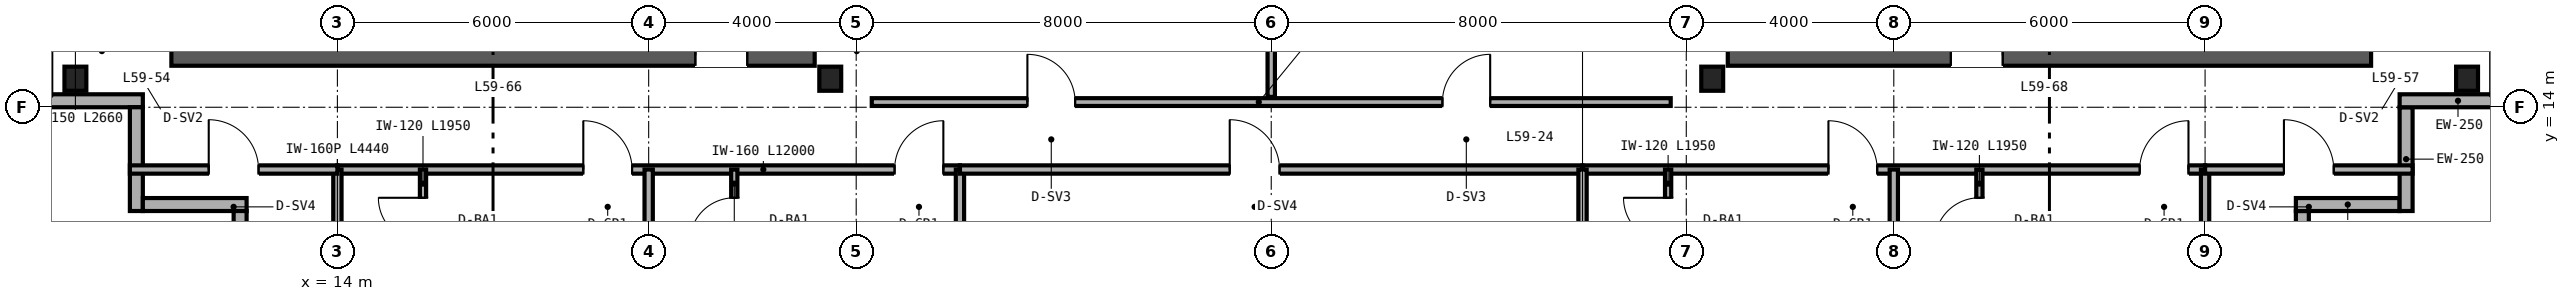
"""IFC4 building model, lengths in metres.
Left out: names, types, materials, properties, quantities, classifications, styles, units other than length and angle.
Written with IfcOpenShell. Run it as: python <this file> out.ifc"""

import sys

from ifc_helpers import new_model, si_unit, direction, frame, frame_2d, origin, origin_2d, place, context, subcontext, project, spatial, rectangle, i_section, extrude, source, transform, mapped, element, fill, save


model = new_model("IFC4")
c1 = context("Model", 3, precision=1e-05, world=origin(), true_north=direction((0.0, 1.0)))
c2 = subcontext(c1, "Body", "Model", "MODEL_VIEW")
j1 = project(units=[si_unit("LENGTHUNIT", "METRE"), si_unit("PLANEANGLEUNIT", "RADIAN")], contexts=[c1])
p1 = place(None, origin())
s1 = spatial("IfcSite", under=j1, at=p1, CompositionType="ELEMENT")
p2 = place(p1, origin())
s2 = spatial("IfcBuilding", under=s1, at=p2, CompositionType="ELEMENT")
p3 = place(p2, frame((0.0, 0.0, 236.4)))
s3 = spatial("IfcBuildingStorey", under=s2, at=p3, CompositionType="ELEMENT", Elevation=236.4)
p4 = place(p3, frame((10.8, 15.0, 0.0), z_axis=(0.0, 0.0, 1.0), x_axis=(1.0, 0.0, 0.0)))
e1 = element("IfcWall", 1, at=p4, inside=s3, PredefinedType="SHEAR", context=c2, shape_type="SweptSolid", body=[
    extrude(rectangle(XDim=12.4, YDim=0.4, at=frame_2d((6.2, 0.0))), origin(), (0.0, 0.0, 1.0), 3.38),
])
p5 = place(p4, frame((10.1, 0.0, 0.0)))
e2 = element("IfcOpeningElement", 2, at=p5, cuts=e1, PredefinedType="OPENING", context=c2, shape_type="SweptSolid", body=[
    extrude(rectangle(XDim=1.0, YDim=2.15, at=frame_2d((0.5, 1.075))), frame((0.0, 0.21, 0.0), z_axis=(0.0, -1.0, 0.0), x_axis=(1.0, 0.0, 0.0)), (0.0, 0.0, 1.0), 0.42),
])
p6 = place(p3, frame((40.8, 15.0, 0.0), z_axis=(0.0, 0.0, 1.0), x_axis=(1.0, 0.0, 0.0)))
e3 = element("IfcWall", 3, at=p6, inside=s3, PredefinedType="SHEAR", context=c2, shape_type="SweptSolid", body=[
    extrude(rectangle(XDim=12.4, YDim=0.4, at=frame_2d((6.2, 0.0))), origin(), (0.0, 0.0, 1.0), 3.38),
])
p7 = place(p6, frame((4.3, 0.0, 0.0)))
e4 = element("IfcOpeningElement", 4, at=p7, cuts=e3, PredefinedType="OPENING", context=c2, shape_type="SweptSolid", body=[
    extrude(rectangle(XDim=1.0, YDim=2.15, at=frame_2d((0.5, 1.075))), frame((0.0, 0.21, 0.0), z_axis=(0.0, -1.0, 0.0), x_axis=(1.0, 0.0, 0.0)), (0.0, 0.0, 1.0), 0.42),
])
m1 = source(origin(), c2, "Body", "SweptSolid", [
    extrude(i_section(OverallWidth=0.422, OverallDepth=0.465, WebThickness=0.045, FlangeThickness=0.073, FilletRadius=0.025, at=origin_2d()), origin(), (0.0, 0.0, 1.0), 3.38),
])
for number, where, z_axis, x_axis in (
    (5, (8.95, 14.55, 0.0), (0.0, 0.0, 1.0), (1.0, 0.0, 0.0)),
    (6, (23.5, 14.55, 0.0), (0.0, 0.0, 1.0), (1.0, 0.0, 0.0)),
    (7, (40.5, 14.55, 0.0), (0.0, 0.0, 1.0), (1.0, 0.0, 0.0)),
    (8, (55.05, 14.55, 0.0), (0.0, 0.0, 1.0), (1.0, 0.0, 0.0)),
):
    element("IfcColumn", number, at=place(p3, frame(where, z_axis=z_axis, x_axis=x_axis)), inside=s3, PredefinedType="COLUMN", context=c2, shape_type="MappedRepresentation", body=[
        mapped(m1, transform((0.0, 0.0, 0.0), scale=1.0)),
    ])
p8 = place(p3, frame((51.875, 10.0, 0.0), z_axis=(0.0, 0.0, 1.0), x_axis=(0.0, 1.0, 0.0)))
e9 = element("IfcWall", 9, at=p8, inside=s3, PredefinedType="SOLIDWALL", context=c2, shape_type="SweptSolid", body=[
    extrude(rectangle(XDim=2.0, YDim=0.25, at=frame_2d((1.0, 0.0))), origin(), (0.0, 0.0, 1.0), 3.38),
])
p9 = place(p8, frame((0.5, 0.0, 0.85)))
e10 = element("IfcOpeningElement", 10, at=p9, cuts=e9, PredefinedType="OPENING", context=c2, shape_type="SweptSolid", body=[
    extrude(rectangle(XDim=1.0, YDim=1.9, at=frame_2d((0.5, 0.95))), frame((0.0, 0.135, 0.0), z_axis=(0.0, -1.0, 0.0), x_axis=(1.0, 0.0, 0.0)), (0.0, 0.0, 1.0), 0.27),
])
for number, where, z_axis, x_axis in (
    (11, (51.75, 12.125, 0.0), (0.0, 0.0, 1.0), (1.0, 0.0, 0.0)),
    (12, (53.875, 12.0, 0.0), (0.0, 0.0, 1.0), (0.0, 1.0, 0.0)),
):
    element("IfcWall", number, at=place(p3, frame(where, z_axis=z_axis, x_axis=x_axis)), inside=s3, PredefinedType="SOLIDWALL", context=c2, shape_type="SweptSolid", body=[
        extrude(rectangle(XDim=2.0, YDim=0.25, at=frame_2d((1.0, 0.0))), origin(), (0.0, 0.0, 1.0), 3.38),
    ])
for number, where, z_axis, x_axis in (
    (13, (53.75, 14.125, 0.0), (0.0, 0.0, 1.0), (1.0, 0.0, 0.0)),
    (14, (8.0, 14.125, 0.0), (0.0, 0.0, 1.0), (1.0, 0.0, 0.0)),
):
    element("IfcWall", number, at=place(p3, frame(where, z_axis=z_axis, x_axis=x_axis)), inside=s3, PredefinedType="SOLIDWALL", context=c2, shape_type="SweptSolid", body=[
        extrude(rectangle(XDim=2.25, YDim=0.25, at=frame_2d((1.125, 0.0))), origin(), (0.0, 0.0, 1.0), 3.38),
    ])
for number, where, z_axis, x_axis in (
    (15, (10.125, 14.0, 0.0), (0.0, 0.0, 1.0), (0.0, -1.0, 0.0)),
    (16, (10.25, 12.125, 0.0), (0.0, 0.0, 1.0), (1.0, 0.0, 0.0)),
    (17, (12.125, 12.0, 0.0), (0.0, 0.0, 1.0), (0.0, -1.0, 0.0)),
):
    element("IfcWall", number, at=place(p3, frame(where, z_axis=z_axis, x_axis=x_axis)), inside=s3, PredefinedType="SOLIDWALL", context=c2, shape_type="SweptSolid", body=[
        extrude(rectangle(XDim=2.0, YDim=0.25, at=frame_2d((1.0, 0.0))), origin(), (0.0, 0.0, 1.0), 3.38),
    ])
p10 = place(p3, frame((32.0, 14.2, 0.0), z_axis=(0.0, 0.0, 1.0), x_axis=(0.0, 1.0, 0.0)))
e18 = element("IfcWall", 18, at=p10, inside=s3, PredefinedType="PARTITIONING", context=c2, shape_type="SweptSolid", body=[
    extrude(rectangle(XDim=2.65, YDim=0.142, at=frame_2d((1.325, 0.0))), origin(), (0.0, 0.0, 1.0), 3.38),
])
p11 = place(p3, frame((24.3, 14.1, 0.0), z_axis=(0.0, 0.0, 1.0), x_axis=(1.0, 0.0, 0.0)))
e19 = element("IfcWall", 19, at=p11, inside=s3, PredefinedType="PARTITIONING", context=c2, shape_type="SweptSolid", body=[
    extrude(rectangle(XDim=15.4, YDim=0.15, at=frame_2d((7.7, 0.0))), origin(), (0.0, 0.0, 1.0), 3.38),
])
p12 = place(p11, frame((3.0, 0.0, 0.0)))
e20 = element("IfcOpeningElement", 20, at=p12, cuts=e19, PredefinedType="OPENING", context=c2, shape_type="SweptSolid", body=[
    extrude(rectangle(XDim=0.92, YDim=2.15, at=frame_2d((0.46, 1.075))), frame((0.0, 0.085, 0.0), z_axis=(0.0, -1.0, 0.0), x_axis=(1.0, 0.0, 0.0)), (0.0, 0.0, 1.0), 0.17),
])
p13 = place(p11, frame((11.0, 0.0, 0.0)))
e21 = element("IfcOpeningElement", 21, at=p13, cuts=e19, PredefinedType="OPENING", context=c2, shape_type="SweptSolid", body=[
    extrude(rectangle(XDim=0.92, YDim=2.15, at=frame_2d((0.46, 1.075))), frame((0.0, 0.085, 0.0), z_axis=(0.0, -1.0, 0.0), x_axis=(1.0, 0.0, 0.0)), (0.0, 0.0, 1.0), 0.17),
])
p14 = place(p3, frame((14.0, 12.8, 0.0), z_axis=(0.0, 0.0, 1.0), x_axis=(1.0, 0.0, 0.0)))
e22 = element("IfcWall", 22, at=p14, inside=s3, PredefinedType="PARTITIONING", context=c2, shape_type="SweptSolid", body=[
    extrude(rectangle(XDim=12.0, YDim=0.16, at=frame_2d((6.0, 0.0))), origin(), (0.0, 0.0, 1.0), 2.923),
])
p15 = place(p14, frame((4.74, 0.0, 0.0)))
e23 = element("IfcOpeningElement", 23, at=p15, cuts=e22, PredefinedType="OPENING", context=c2, shape_type="SweptSolid", body=[
    extrude(rectangle(XDim=0.94, YDim=2.15, at=frame_2d((0.47, 1.075))), frame((0.0, 0.09, 0.0), z_axis=(0.0, -1.0, 0.0), x_axis=(1.0, 0.0, 0.0)), (0.0, 0.0, 1.0), 0.18),
])
p16 = place(p14, frame((10.74, 0.0, 0.0)))
e24 = element("IfcOpeningElement", 24, at=p16, cuts=e22, PredefinedType="OPENING", context=c2, shape_type="SweptSolid", body=[
    extrude(rectangle(XDim=0.94, YDim=2.15, at=frame_2d((0.47, 1.075))), frame((0.0, 0.09, 0.0), z_axis=(0.0, -1.0, 0.0), x_axis=(1.0, 0.0, 0.0)), (0.0, 0.0, 1.0), 0.18),
])
p17 = place(p3, frame((14.0, 8.36, 0.0), z_axis=(0.0, 0.0, 1.0), x_axis=(0.0, 1.0, 0.0)))
e25 = element("IfcWall", 25, at=p17, inside=s3, PredefinedType="PARTITIONING", context=c2, shape_type="SweptSolid", body=[
    extrude(rectangle(XDim=4.44, YDim=0.16, at=frame_2d((2.22, 0.0))), origin(), (0.0, 0.0, 1.0), 2.687),
])
p18 = place(p3, frame((26.0, 8.36, 0.0), z_axis=(0.0, 0.0, 1.0), x_axis=(0.0, 1.0, 0.0)))
e26 = element("IfcWall", 26, at=p18, inside=s3, PredefinedType="PARTITIONING", context=c2, shape_type="SweptSolid", body=[
    extrude(rectangle(XDim=4.44, YDim=0.16, at=frame_2d((2.22, 0.0))), origin(), (0.0, 0.0, 1.0), 2.453),
])
p19 = place(p3, frame((20.0, 8.36, 0.0), z_axis=(0.0, 0.0, 1.0), x_axis=(0.0, 1.0, 0.0)))
e27 = element("IfcWall", 27, at=p19, inside=s3, PredefinedType="PARTITIONING", context=c2, shape_type="SweptSolid", body=[
    extrude(rectangle(XDim=4.44, YDim=0.16, at=frame_2d((2.22, 0.0))), origin(), (0.0, 0.0, 1.0), 2.687),
])
p20 = place(p3, frame((15.65, 10.85, 0.0), z_axis=(0.0, 0.0, 1.0), x_axis=(0.0, 1.0, 0.0)))
e28 = element("IfcWall", 28, at=p20, inside=s3, PredefinedType="PARTITIONING", context=c2, shape_type="SweptSolid", body=[
    extrude(rectangle(XDim=1.95, YDim=0.12, at=frame_2d((0.975, 0.0))), origin(), (0.0, 0.0, 1.0), 3.38),
])
p21 = place(p20, frame((0.545, 0.0, 0.0)))
e29 = element("IfcOpeningElement", 29, at=p21, cuts=e28, PredefinedType="OPENING", context=c2, shape_type="SweptSolid", body=[
    extrude(rectangle(XDim=0.86, YDim=2.1, at=frame_2d((0.43, 1.05))), frame((0.0, 0.07, 0.0), z_axis=(0.0, -1.0, 0.0), x_axis=(1.0, 0.0, 0.0)), (0.0, 0.0, 1.0), 0.14),
])
p22 = place(p3, frame((21.65, 10.85, 0.0), z_axis=(0.0, 0.0, 1.0), x_axis=(0.0, 1.0, 0.0)))
e30 = element("IfcWall", 30, at=p22, inside=s3, PredefinedType="PARTITIONING", context=c2, shape_type="SweptSolid", body=[
    extrude(rectangle(XDim=1.95, YDim=0.12, at=frame_2d((0.975, 0.0))), origin(), (0.0, 0.0, 1.0), 3.38),
])
p23 = place(p22, frame((0.545, 0.0, 0.0)))
e31 = element("IfcOpeningElement", 31, at=p23, cuts=e30, PredefinedType="OPENING", context=c2, shape_type="SweptSolid", body=[
    extrude(rectangle(XDim=0.86, YDim=2.1, at=frame_2d((0.43, 1.05))), frame((0.0, 0.07, 0.0), z_axis=(0.0, -1.0, 0.0), x_axis=(1.0, 0.0, 0.0)), (0.0, 0.0, 1.0), 0.14),
])
p24 = place(p3, frame((26.0, 12.8, 0.0), z_axis=(0.0, 0.0, 1.0), x_axis=(1.0, 0.0, 0.0)))
e32 = element("IfcWall", 32, at=p24, inside=s3, PredefinedType="PARTITIONING", context=c2, shape_type="SweptSolid", body=[
    extrude(rectangle(XDim=12.0, YDim=0.16, at=frame_2d((6.0, 0.0))), origin(), (0.0, 0.0, 1.0), 3.38),
])
p25 = place(p24, frame((5.2, 0.0, 0.0)))
e33 = element("IfcOpeningElement", 33, at=p25, cuts=e32, PredefinedType="OPENING", context=c2, shape_type="SweptSolid", body=[
    extrude(rectangle(XDim=0.96, YDim=2.15, at=frame_2d((0.48, 1.075))), frame((0.0, 0.09, 0.0), z_axis=(0.0, -1.0, 0.0), x_axis=(1.0, 0.0, 0.0)), (0.0, 0.0, 1.0), 0.18),
])
p26 = place(p3, frame((38.0, 12.8, 0.0), z_axis=(0.0, 0.0, 1.0), x_axis=(1.0, 0.0, 0.0)))
e34 = element("IfcWall", 34, at=p26, inside=s3, PredefinedType="PARTITIONING", context=c2, shape_type="SweptSolid", body=[
    extrude(rectangle(XDim=12.0, YDim=0.16, at=frame_2d((6.0, 0.0))), origin(), (0.0, 0.0, 1.0), 2.923),
])
p27 = place(p26, frame((4.74, 0.0, 0.0)))
e35 = element("IfcOpeningElement", 35, at=p27, cuts=e34, PredefinedType="OPENING", context=c2, shape_type="SweptSolid", body=[
    extrude(rectangle(XDim=0.94, YDim=2.15, at=frame_2d((0.47, 1.075))), frame((0.0, 0.09, 0.0), z_axis=(0.0, -1.0, 0.0), x_axis=(1.0, 0.0, 0.0)), (0.0, 0.0, 1.0), 0.18),
])
p28 = place(p26, frame((10.74, 0.0, 0.0)))
e36 = element("IfcOpeningElement", 36, at=p28, cuts=e34, PredefinedType="OPENING", context=c2, shape_type="SweptSolid", body=[
    extrude(rectangle(XDim=0.94, YDim=2.15, at=frame_2d((0.47, 1.075))), frame((0.0, 0.09, 0.0), z_axis=(0.0, -1.0, 0.0), x_axis=(1.0, 0.0, 0.0)), (0.0, 0.0, 1.0), 0.18),
])
p29 = place(p3, frame((38.0, 8.36, 0.0), z_axis=(0.0, 0.0, 1.0), x_axis=(0.0, 1.0, 0.0)))
e37 = element("IfcWall", 37, at=p29, inside=s3, PredefinedType="PARTITIONING", context=c2, shape_type="SweptSolid", body=[
    extrude(rectangle(XDim=4.44, YDim=0.16, at=frame_2d((2.22, 0.0))), origin(), (0.0, 0.0, 1.0), 2.453),
])
for number, where, z_axis, x_axis in (
    (38, (50.0, 8.36, 0.0), (0.0, 0.0, 1.0), (0.0, 1.0, 0.0)),
    (39, (44.0, 8.36, 0.0), (0.0, 0.0, 1.0), (0.0, 1.0, 0.0)),
):
    element("IfcWall", number, at=place(p3, frame(where, z_axis=z_axis, x_axis=x_axis)), inside=s3, PredefinedType="PARTITIONING", context=c2, shape_type="SweptSolid", body=[
        extrude(rectangle(XDim=4.44, YDim=0.16, at=frame_2d((2.22, 0.0))), origin(), (0.0, 0.0, 1.0), 2.687),
    ])
p30 = place(p3, frame((39.65, 10.85, 0.0), z_axis=(0.0, 0.0, 1.0), x_axis=(0.0, 1.0, 0.0)))
e40 = element("IfcWall", 40, at=p30, inside=s3, PredefinedType="PARTITIONING", context=c2, shape_type="SweptSolid", body=[
    extrude(rectangle(XDim=1.95, YDim=0.12, at=frame_2d((0.975, 0.0))), origin(), (0.0, 0.0, 1.0), 3.38),
])
p31 = place(p30, frame((0.545, 0.0, 0.0)))
e41 = element("IfcOpeningElement", 41, at=p31, cuts=e40, PredefinedType="OPENING", context=c2, shape_type="SweptSolid", body=[
    extrude(rectangle(XDim=0.86, YDim=2.1, at=frame_2d((0.43, 1.05))), frame((0.0, 0.07, 0.0), z_axis=(0.0, -1.0, 0.0), x_axis=(1.0, 0.0, 0.0)), (0.0, 0.0, 1.0), 0.14),
])
p32 = place(p3, frame((45.65, 10.85, 0.0), z_axis=(0.0, 0.0, 1.0), x_axis=(0.0, 1.0, 0.0)))
e42 = element("IfcWall", 42, at=p32, inside=s3, PredefinedType="PARTITIONING", context=c2, shape_type="SweptSolid", body=[
    extrude(rectangle(XDim=1.95, YDim=0.12, at=frame_2d((0.975, 0.0))), origin(), (0.0, 0.0, 1.0), 3.38),
])
p33 = place(p32, frame((0.545, 0.0, 0.0)))
e43 = element("IfcOpeningElement", 43, at=p33, cuts=e42, PredefinedType="OPENING", context=c2, shape_type="SweptSolid", body=[
    extrude(rectangle(XDim=0.86, YDim=2.1, at=frame_2d((0.43, 1.05))), frame((0.0, 0.07, 0.0), z_axis=(0.0, -1.0, 0.0), x_axis=(1.0, 0.0, 0.0)), (0.0, 0.0, 1.0), 0.14),
])
p34 = place(p3, frame((10.0, 12.8, 0.0), z_axis=(0.0, 0.0, 1.0), x_axis=(1.0, 0.0, 0.0)))
e44 = element("IfcWall", 44, at=p34, inside=s3, PredefinedType="PARTITIONING", context=c2, shape_type="SweptSolid", body=[
    extrude(rectangle(XDim=4.0, YDim=0.16, at=frame_2d((2.0, 0.0))), origin(), (0.0, 0.0, 1.0), 3.38),
])
p35 = place(p34, frame((1.52, 0.0, 0.0)))
e45 = element("IfcOpeningElement", 45, at=p35, cuts=e44, PredefinedType="OPENING", context=c2, shape_type="SweptSolid", body=[
    extrude(rectangle(XDim=0.96, YDim=2.15, at=frame_2d((0.48, 1.075))), frame((0.0, 0.09, 0.0), z_axis=(0.0, -1.0, 0.0), x_axis=(1.0, 0.0, 0.0)), (0.0, 0.0, 1.0), 0.18),
])
p36 = place(p3, frame((50.0, 12.8, 0.0), z_axis=(0.0, 0.0, 1.0), x_axis=(1.0, 0.0, 0.0)))
e46 = element("IfcWall", 46, at=p36, inside=s3, PredefinedType="PARTITIONING", context=c2, shape_type="SweptSolid", body=[
    extrude(rectangle(XDim=4.0, YDim=0.16, at=frame_2d((2.0, 0.0))), origin(), (0.0, 0.0, 1.0), 3.38),
])
p37 = place(p36, frame((1.52, 0.0, 0.0)))
e47 = element("IfcOpeningElement", 47, at=p37, cuts=e46, PredefinedType="OPENING", context=c2, shape_type="SweptSolid", body=[
    extrude(rectangle(XDim=0.96, YDim=2.15, at=frame_2d((0.48, 1.075))), frame((0.0, 0.09, 0.0), z_axis=(0.0, -1.0, 0.0), x_axis=(1.0, 0.0, 0.0)), (0.0, 0.0, 1.0), 0.18),
])
m2 = source(origin(), c2, "Body", "SweptSolid", [
    extrude(rectangle(XDim=1.0, YDim=2.15, at=frame_2d((0.5, 1.075))), frame((0.0, 0.025, 0.0), z_axis=(0.0, -1.0, 0.0), x_axis=(1.0, 0.0, 0.0)), (0.0, 0.0, 1.0), 0.05),
])
p38 = place(p5, origin())
e48 = element("IfcDoor", 48, at=p38, inside=s3, OperationType="SINGLE_SWING_LEFT", PredefinedType="DOOR", context=c2, shape_type="MappedRepresentation", body=[
    mapped(m2, transform((0.0, 0.0, 0.0), scale=1.0)),
])
fill(e2, e48)
p39 = place(p7, origin())
e49 = element("IfcDoor", 49, at=p39, inside=s3, OperationType="SINGLE_SWING_RIGHT", PredefinedType="DOOR", context=c2, shape_type="MappedRepresentation", body=[
    mapped(m2, transform((0.0, 0.0, 0.0), scale=1.0)),
])
fill(e4, e49)
m3 = source(origin(), c2, "Body", "SweptSolid", [
    extrude(rectangle(XDim=0.92, YDim=2.15, at=frame_2d((0.46, 1.075))), frame((0.0, 0.025, 0.0), z_axis=(0.0, -1.0, 0.0), x_axis=(1.0, 0.0, 0.0)), (0.0, 0.0, 1.0), 0.05),
])
p40 = place(p12, origin())
e50 = element("IfcDoor", 50, at=p40, inside=s3, OperationType="SINGLE_SWING_LEFT", PredefinedType="DOOR", context=c2, shape_type="MappedRepresentation", body=[
    mapped(m3, transform((0.0, 0.0, 0.0), scale=1.0)),
])
fill(e20, e50)
p41 = place(p13, origin())
e51 = element("IfcDoor", 51, at=p41, inside=s3, OperationType="SINGLE_SWING_RIGHT", PredefinedType="DOOR", context=c2, shape_type="MappedRepresentation", body=[
    mapped(m3, transform((0.0, 0.0, 0.0), scale=1.0)),
])
fill(e21, e51)
m4 = source(origin(), c2, "Body", "SweptSolid", [
    extrude(rectangle(XDim=0.86, YDim=2.1, at=frame_2d((0.43, 1.05))), frame((0.0, 0.025, 0.0), z_axis=(0.0, -1.0, 0.0), x_axis=(1.0, 0.0, 0.0)), (0.0, 0.0, 1.0), 0.05),
])
p42 = place(p21, origin())
e52 = element("IfcDoor", 52, at=p42, inside=s3, OperationType="SINGLE_SWING_RIGHT", PredefinedType="DOOR", context=c2, shape_type="MappedRepresentation", body=[
    mapped(m4, transform((0.0, 0.0, 0.0), scale=1.0)),
])
fill(e29, e52)
p43 = place(p23, origin())
e53 = element("IfcDoor", 53, at=p43, inside=s3, OperationType="SINGLE_SWING_LEFT", PredefinedType="DOOR", context=c2, shape_type="MappedRepresentation", body=[
    mapped(m4, transform((0.0, 0.0, 0.0), scale=1.0)),
])
fill(e31, e53)
m5 = source(origin(), c2, "Body", "SweptSolid", [
    extrude(rectangle(XDim=0.94, YDim=2.15, at=frame_2d((0.47, 1.075))), frame((0.0, 0.025, 0.0), z_axis=(0.0, -1.0, 0.0), x_axis=(1.0, 0.0, 0.0)), (0.0, 0.0, 1.0), 0.05),
])
p44 = place(p15, origin())
e54 = element("IfcDoor", 54, at=p44, inside=s3, OperationType="SINGLE_SWING_LEFT", PredefinedType="DOOR", context=c2, shape_type="MappedRepresentation", body=[
    mapped(m5, transform((0.0, 0.0, 0.0), scale=1.0)),
])
fill(e23, e54)
p45 = place(p16, origin())
e55 = element("IfcDoor", 55, at=p45, inside=s3, OperationType="SINGLE_SWING_RIGHT", PredefinedType="DOOR", context=c2, shape_type="MappedRepresentation", body=[
    mapped(m5, transform((0.0, 0.0, 0.0), scale=1.0)),
])
fill(e24, e55)
m6 = source(origin(), c2, "Body", "SweptSolid", [
    extrude(rectangle(XDim=0.96, YDim=2.15, at=frame_2d((0.48, 1.075))), frame((0.0, 0.025, 0.0), z_axis=(0.0, -1.0, 0.0), x_axis=(1.0, 0.0, 0.0)), (0.0, 0.0, 1.0), 0.05),
])
p46 = place(p25, origin())
e56 = element("IfcDoor", 56, at=p46, inside=s3, OperationType="SINGLE_SWING_LEFT", PredefinedType="DOOR", context=c2, shape_type="MappedRepresentation", body=[
    mapped(m6, transform((0.0, 0.0, 0.0), scale=1.0)),
])
fill(e33, e56)
p47 = place(p31, origin())
e57 = element("IfcDoor", 57, at=p47, inside=s3, OperationType="SINGLE_SWING_RIGHT", PredefinedType="DOOR", context=c2, shape_type="MappedRepresentation", body=[
    mapped(m4, transform((0.0, 0.0, 0.0), scale=1.0)),
])
fill(e41, e57)
p48 = place(p33, origin())
e58 = element("IfcDoor", 58, at=p48, inside=s3, OperationType="SINGLE_SWING_LEFT", PredefinedType="DOOR", context=c2, shape_type="MappedRepresentation", body=[
    mapped(m4, transform((0.0, 0.0, 0.0), scale=1.0)),
])
fill(e43, e58)
p49 = place(p27, origin())
e59 = element("IfcDoor", 59, at=p49, inside=s3, OperationType="SINGLE_SWING_LEFT", PredefinedType="DOOR", context=c2, shape_type="MappedRepresentation", body=[
    mapped(m5, transform((0.0, 0.0, 0.0), scale=1.0)),
])
fill(e35, e59)
p50 = place(p28, origin())
e60 = element("IfcDoor", 60, at=p50, inside=s3, OperationType="SINGLE_SWING_RIGHT", PredefinedType="DOOR", context=c2, shape_type="MappedRepresentation", body=[
    mapped(m5, transform((0.0, 0.0, 0.0), scale=1.0)),
])
fill(e36, e60)
p51 = place(p35, origin())
e61 = element("IfcDoor", 61, at=p51, inside=s3, OperationType="SINGLE_SWING_LEFT", PredefinedType="DOOR", context=c2, shape_type="MappedRepresentation", body=[
    mapped(m6, transform((0.0, 0.0, 0.0), scale=1.0)),
])
fill(e45, e61)
p52 = place(p37, origin())
e62 = element("IfcDoor", 62, at=p52, inside=s3, OperationType="SINGLE_SWING_LEFT", PredefinedType="DOOR", context=c2, shape_type="MappedRepresentation", body=[
    mapped(m6, transform((0.0, 0.0, 0.0), scale=1.0)),
])
fill(e47, e62)
save(model, sys.argv[1])
